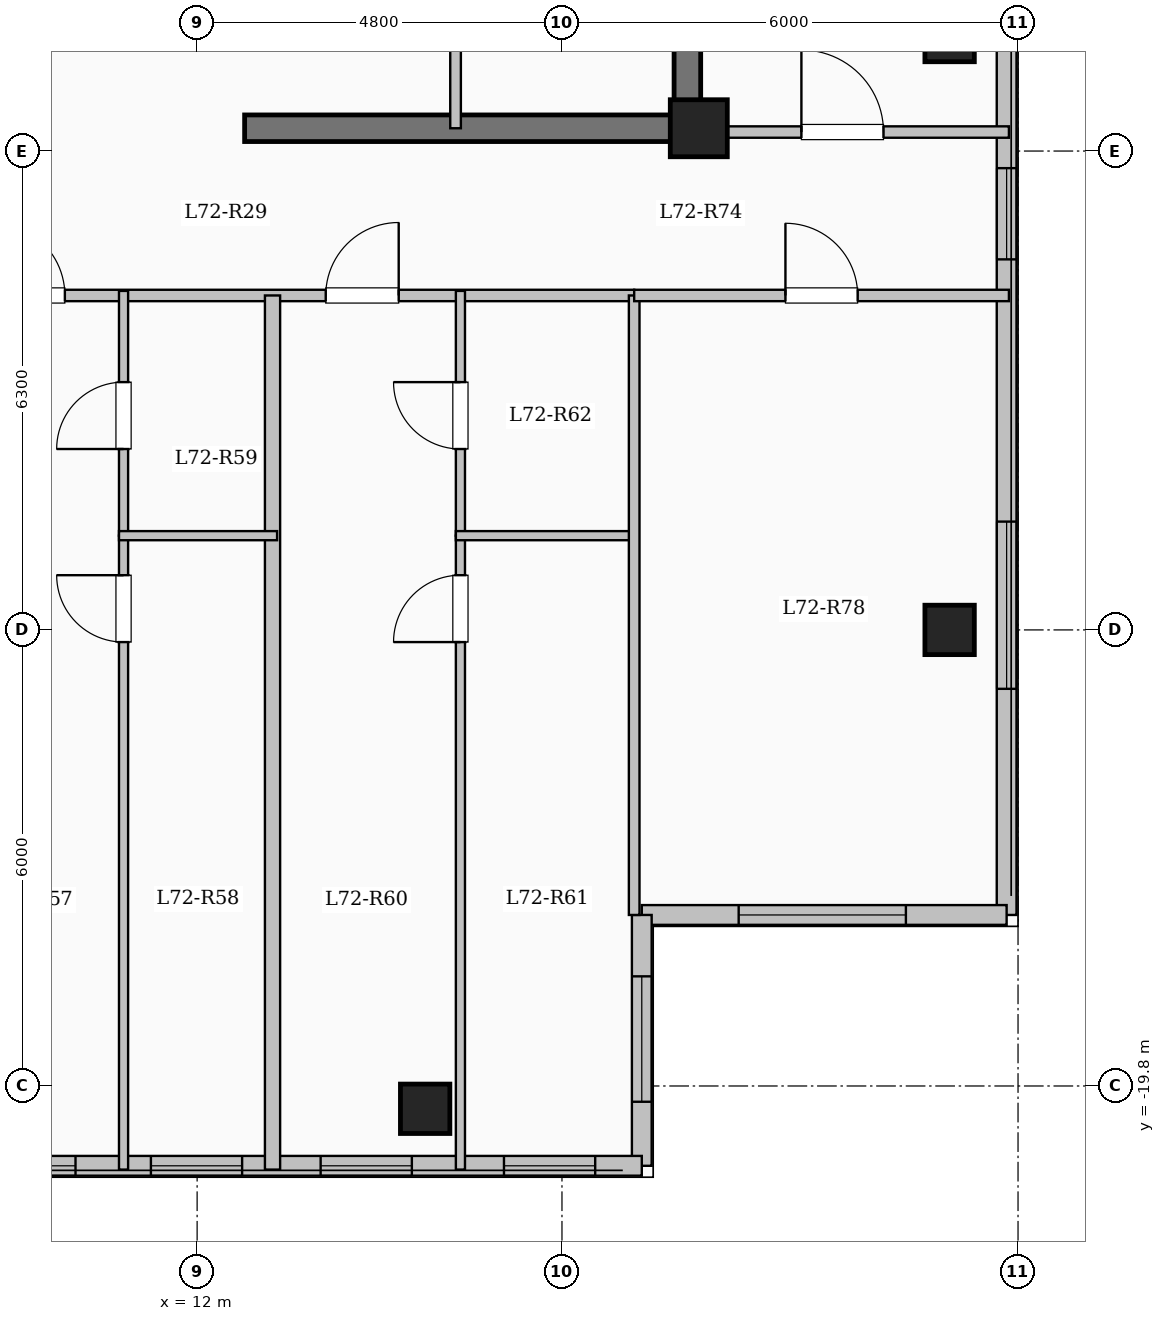
"""IFC4 building model, lengths in metres.
Left out: names, types, materials, properties, quantities, classifications, styles, units other than length and angle.
Written with IfcOpenShell. Run it as: python <this file> out.ifc"""

import sys

from ifc_helpers import new_model, si_unit, direction, frame, frame_2d, origin, origin_2d, place, context, subcontext, project, spatial, rectangle, extrude, element, fill, save


model = new_model("IFC4")
c1 = context("Model", 3, precision=1e-05, world=origin(), true_north=direction((0.0, 1.0)))
c2 = subcontext(c1, "Body", "Model", "MODEL_VIEW")
j1 = project(units=[si_unit("LENGTHUNIT", "METRE"), si_unit("PLANEANGLEUNIT", "RADIAN")], contexts=[c1])
p1 = place(None, origin())
s1 = spatial("IfcSite", under=j1, at=p1, CompositionType="ELEMENT")
p2 = place(p1, origin())
s2 = spatial("IfcBuilding", under=s1, at=p2, CompositionType="ELEMENT")
p3 = place(p2, frame((0.0, 0.0, 264.95)))
s3 = spatial("IfcBuildingStorey", under=s2, at=p3, CompositionType="ELEMENT", Elevation=264.95)
p4 = place(p3, frame((18.6, -7.2, 0.0), z_axis=(0.0, 0.0, 1.0), x_axis=(1.0, 0.0, 0.0)))
e1 = element("IfcColumn", 1, at=p4, inside=s3, PredefinedType="COLUMN", context=c2, shape_type="SweptSolid", body=[
    extrude(rectangle(XDim=0.75, YDim=0.75, at=origin_2d()), origin(), (0.0, 0.0, 1.0), 3.35),
])
for number, where, z_axis, x_axis in (
    (2, (15.0, -20.1, 0.0), (0.0, 0.0, 1.0), (1.0, 0.0, 0.0)),
    (3, (21.9, -13.8, 0.0), (0.0, 0.0, 1.0), (1.0, 0.0, 0.0)),
    (4, (21.9, -6.0, 0.0), (0.0, 0.0, 1.0), (1.0, 0.0, 0.0)),
):
    element("IfcColumn", number, at=place(p3, frame(where, z_axis=z_axis, x_axis=x_axis)), inside=s3, PredefinedType="COLUMN", context=c2, shape_type="SweptSolid", body=[
        extrude(rectangle(XDim=0.65, YDim=0.65, at=origin_2d()), origin(), (0.0, 0.0, 1.0), 3.35),
    ])
p5 = place(p3, frame((22.65, 17.55, 0.0), z_axis=(0.0, 0.0, 1.0), x_axis=(0.0, -1.0, 0.0)))
e5 = element("IfcWall", 5, at=p5, inside=s3, PredefinedType="SOLIDWALL", context=c2, shape_type="SweptSolid", body=[
    extrude(rectangle(XDim=35.1, YDim=0.26, at=frame_2d((17.55, 0.0))), origin(), (0.0, 0.0, 1.0), 3.1),
])
p6 = place(p5, frame((1.525, 0.0, 0.9)))
e6 = element("IfcOpeningElement", 6, at=p6, cuts=e5, PredefinedType="OPENING", context=c2, shape_type="SweptSolid", body=[
    extrude(rectangle(XDim=2.0, YDim=1.7, at=frame_2d((1.0, 0.85))), frame((0.0, 0.14, 0.0), z_axis=(0.0, -1.0, 0.0), x_axis=(1.0, 0.0, 0.0)), (0.0, 0.0, 1.0), 0.28),
])
p7 = place(p5, frame((5.425, 0.0, 0.95)))
e7 = element("IfcOpeningElement", 7, at=p7, cuts=e5, PredefinedType="OPENING", context=c2, shape_type="SweptSolid", body=[
    extrude(rectangle(XDim=1.0, YDim=1.5, at=frame_2d((0.5, 0.75))), frame((0.0, 0.14, 0.0), z_axis=(0.0, -1.0, 0.0), x_axis=(1.0, 0.0, 0.0)), (0.0, 0.0, 1.0), 0.28),
])
p8 = place(p5, frame((14.8, 0.0, 0.9)))
e8 = element("IfcOpeningElement", 8, at=p8, cuts=e5, PredefinedType="OPENING", context=c2, shape_type="SweptSolid", body=[
    extrude(rectangle(XDim=2.0, YDim=1.7, at=frame_2d((1.0, 0.85))), frame((0.0, 0.14, 0.0), z_axis=(0.0, -1.0, 0.0), x_axis=(1.0, 0.0, 0.0)), (0.0, 0.0, 1.0), 0.28),
])
p9 = place(p5, frame((25.275, 0.0, 0.95)))
e9 = element("IfcOpeningElement", 9, at=p9, cuts=e5, PredefinedType="OPENING", context=c2, shape_type="SweptSolid", body=[
    extrude(rectangle(XDim=1.2, YDim=1.5, at=frame_2d((0.6, 0.75))), frame((0.0, 0.14, 0.0), z_axis=(0.0, -1.0, 0.0), x_axis=(1.0, 0.0, 0.0)), (0.0, 0.0, 1.0), 0.28),
])
p10 = place(p5, frame((29.925, 0.0, 0.9)))
e10 = element("IfcOpeningElement", 10, at=p10, cuts=e5, PredefinedType="OPENING", context=c2, shape_type="SweptSolid", body=[
    extrude(rectangle(XDim=2.2, YDim=1.75, at=frame_2d((1.1, 0.875))), frame((0.0, 0.14, 0.0), z_axis=(0.0, -1.0, 0.0), x_axis=(1.0, 0.0, 0.0)), (0.0, 0.0, 1.0), 0.28),
])
p11 = place(p3, frame((22.65, -17.55, 0.0), z_axis=(0.0, 0.0, 1.0), x_axis=(-1.0, 0.0, 0.0)))
e11 = element("IfcWall", 11, at=p11, inside=s3, PredefinedType="SOLIDWALL", context=c2, shape_type="SweptSolid", body=[
    extrude(rectangle(XDim=4.8, YDim=0.26, at=frame_2d((2.4, 0.0))), origin(), (0.0, 0.0, 1.0), 3.1),
])
p12 = place(p11, frame((1.325, 0.0, 0.9)))
e12 = element("IfcOpeningElement", 12, at=p12, cuts=e11, PredefinedType="OPENING", context=c2, shape_type="SweptSolid", body=[
    extrude(rectangle(XDim=2.2, YDim=1.75, at=frame_2d((1.1, 0.875))), frame((0.0, 0.14, 0.0), z_axis=(0.0, -1.0, 0.0), x_axis=(1.0, 0.0, 0.0)), (0.0, 0.0, 1.0), 0.28),
])
p13 = place(p3, frame((17.85, -17.55, 0.0), z_axis=(0.0, 0.0, 1.0), x_axis=(0.0, -1.0, 0.0)))
e13 = element("IfcWall", 13, at=p13, inside=s3, PredefinedType="SOLIDWALL", context=c2, shape_type="SweptSolid", body=[
    extrude(rectangle(XDim=3.3, YDim=0.26, at=frame_2d((1.65, 0.0))), origin(), (0.0, 0.0, 1.0), 3.1),
])
p14 = place(p13, frame((0.808, 0.0, 0.9)))
e14 = element("IfcOpeningElement", 14, at=p14, cuts=e13, PredefinedType="OPENING", context=c2, shape_type="SweptSolid", body=[
    extrude(rectangle(XDim=1.65, YDim=1.6, at=frame_2d((0.825, 0.8))), frame((0.0, 0.14, 0.0), z_axis=(0.0, -1.0, 0.0), x_axis=(1.0, 0.0, 0.0)), (0.0, 0.0, 1.0), 0.28),
])
p15 = place(p3, frame((17.85, -20.85, 0.0), z_axis=(0.0, 0.0, 1.0), x_axis=(-1.0, 0.0, 0.0)))
e15 = element("IfcWall", 15, at=p15, inside=s3, PredefinedType="SOLIDWALL", context=c2, shape_type="SweptSolid", body=[
    extrude(rectangle(XDim=10.5, YDim=0.26, at=frame_2d((5.25, 0.0))), origin(), (0.0, 0.0, 1.0), 3.1),
])
p16 = place(p15, frame((0.613, 0.0, 0.95)))
e16 = element("IfcOpeningElement", 16, at=p16, cuts=e15, PredefinedType="OPENING", context=c2, shape_type="SweptSolid", body=[
    extrude(rectangle(XDim=1.2, YDim=1.5, at=frame_2d((0.6, 0.75))), frame((0.0, 0.14, 0.0), z_axis=(0.0, -1.0, 0.0), x_axis=(1.0, 0.0, 0.0)), (0.0, 0.0, 1.0), 0.28),
])
p17 = place(p15, frame((3.025, 0.0, 0.95)))
e17 = element("IfcOpeningElement", 17, at=p17, cuts=e15, PredefinedType="OPENING", context=c2, shape_type="SweptSolid", body=[
    extrude(rectangle(XDim=1.2, YDim=1.5, at=frame_2d((0.6, 0.75))), frame((0.0, 0.14, 0.0), z_axis=(0.0, -1.0, 0.0), x_axis=(1.0, 0.0, 0.0)), (0.0, 0.0, 1.0), 0.28),
])
p18 = place(p15, frame((5.258, 0.0, 0.95)))
e18 = element("IfcOpeningElement", 18, at=p18, cuts=e15, PredefinedType="OPENING", context=c2, shape_type="SweptSolid", body=[
    extrude(rectangle(XDim=1.2, YDim=1.5, at=frame_2d((0.6, 0.75))), frame((0.0, 0.14, 0.0), z_axis=(0.0, -1.0, 0.0), x_axis=(1.0, 0.0, 0.0)), (0.0, 0.0, 1.0), 0.28),
])
p19 = place(p15, frame((7.45, 0.0, 0.95)))
e19 = element("IfcOpeningElement", 19, at=p19, cuts=e15, PredefinedType="OPENING", context=c2, shape_type="SweptSolid", body=[
    extrude(rectangle(XDim=1.2, YDim=1.5, at=frame_2d((0.6, 0.75))), frame((0.0, 0.14, 0.0), z_axis=(0.0, -1.0, 0.0), x_axis=(1.0, 0.0, 0.0)), (0.0, 0.0, 1.0), 0.28),
])
p20 = place(p15, frame((9.505, 0.0, 0.95)))
e20 = element("IfcOpeningElement", 20, at=p20, cuts=e15, PredefinedType="OPENING", context=c2, shape_type="SweptSolid", body=[
    extrude(rectangle(XDim=0.85, YDim=1.5, at=frame_2d((0.425, 0.75))), frame((0.0, 0.14, 0.0), z_axis=(0.0, -1.0, 0.0), x_axis=(1.0, 0.0, 0.0)), (0.0, 0.0, 1.0), 0.28),
])
p21 = place(p3, frame((18.45, -7.375, 0.0), z_axis=(0.0, 0.0, 1.0), x_axis=(0.0, 1.0, 0.0)))
e21 = element("IfcWall", 21, at=p21, inside=s3, PredefinedType="SHEAR", context=c2, shape_type="SweptSolid", body=[
    extrude(rectangle(XDim=14.05, YDim=0.35, at=frame_2d((7.025, 0.0))), origin(), (0.0, 0.0, 1.0), 3.35),
])
p22 = place(p3, frame((12.625, -7.2, 0.0), z_axis=(0.0, 0.0, 1.0), x_axis=(1.0, 0.0, 0.0)))
e22 = element("IfcWall", 22, at=p22, inside=s3, PredefinedType="SHEAR", context=c2, shape_type="SweptSolid", body=[
    extrude(rectangle(XDim=6.0, YDim=0.35, at=frame_2d((3.0, 0.0))), origin(), (0.0, 0.0, 1.0), 3.35),
])
p23 = place(p3, frame((15.4, -7.2, 0.0), z_axis=(0.0, 0.0, 1.0), x_axis=(0.0, 1.0, 0.0)))
e23 = element("IfcWall", 23, at=p23, inside=s3, PredefinedType="PARTITIONING", context=c2, shape_type="SweptSolid", body=[
    extrude(rectangle(XDim=10.45, YDim=0.14, at=frame_2d((5.225, 0.0))), origin(), (0.0, 0.0, 1.0), 3.1),
])
p24 = place(p23, frame((9.25, 0.0, 0.0)))
e24 = element("IfcOpeningElement", 24, at=p24, cuts=e23, PredefinedType="OPENING", context=c2, shape_type="SweptSolid", body=[
    extrude(rectangle(XDim=0.9, YDim=2.08, at=frame_2d((0.45, 1.04))), frame((0.0, 0.08, 0.0), z_axis=(0.0, -1.0, 0.0), x_axis=(1.0, 0.0, 0.0)), (0.0, 0.0, 1.0), 0.16),
])
p25 = place(p3, frame((8.55, -9.4, 0.0), z_axis=(0.0, 0.0, 1.0), x_axis=(1.0, 0.0, 0.0)))
e25 = element("IfcWall", 25, at=p25, inside=s3, PredefinedType="PARTITIONING", context=c2, shape_type="SweptSolid", body=[
    extrude(rectangle(XDim=9.2, YDim=0.15, at=frame_2d((4.6, 0.0))), origin(), (0.0, 0.0, 1.0), 3.1),
])
p26 = place(p25, frame((0.75, 0.0, 0.0)))
e26 = element("IfcOpeningElement", 26, at=p26, cuts=e25, PredefinedType="OPENING", context=c2, shape_type="SweptSolid", body=[
    extrude(rectangle(XDim=0.96, YDim=2.15, at=frame_2d((0.48, 1.075))), frame((0.0, 0.085, 0.0), z_axis=(0.0, -1.0, 0.0), x_axis=(1.0, 0.0, 0.0)), (0.0, 0.0, 1.0), 0.17),
])
p27 = place(p25, frame((5.142, 0.0, 0.0)))
e27 = element("IfcOpeningElement", 27, at=p27, cuts=e25, PredefinedType="OPENING", context=c2, shape_type="SweptSolid", body=[
    extrude(rectangle(XDim=0.96, YDim=2.15, at=frame_2d((0.48, 1.075))), frame((0.0, 0.085, 0.0), z_axis=(0.0, -1.0, 0.0), x_axis=(1.0, 0.0, 0.0)), (0.0, 0.0, 1.0), 0.17),
])
p28 = place(p3, frame((12.992, -20.9, 0.0), z_axis=(0.0, 0.0, 1.0), x_axis=(0.0, 1.0, 0.0)))
e28 = element("IfcWall", 28, at=p28, inside=s3, PredefinedType="SOLIDWALL", context=c2, shape_type="SweptSolid", body=[
    extrude(rectangle(XDim=11.5, YDim=0.2, at=frame_2d((5.75, 0.0))), origin(), (0.0, 0.0, 1.0), 3.1),
])
p29 = place(p3, frame((11.032, -20.9, 0.0), z_axis=(0.0, 0.0, 1.0), x_axis=(0.0, 1.0, 0.0)))
e29 = element("IfcWall", 29, at=p29, inside=s3, PredefinedType="PARTITIONING", context=c2, shape_type="SweptSolid", body=[
    extrude(rectangle(XDim=8.34, YDim=0.12, at=frame_2d((4.17, 0.0))), origin(), (0.0, 0.0, 1.0), 3.1),
])
p30 = place(p29, frame((6.94, 0.0, 0.0)))
e30 = element("IfcOpeningElement", 30, at=p30, cuts=e29, PredefinedType="OPENING", context=c2, shape_type="SweptSolid", body=[
    extrude(rectangle(XDim=0.88, YDim=2.1, at=frame_2d((0.44, 1.05))), frame((0.0, 0.07, 0.0), z_axis=(0.0, -1.0, 0.0), x_axis=(1.0, 0.0, 0.0)), (0.0, 0.0, 1.0), 0.14),
])
p31 = place(p3, frame((11.032, -12.56, 0.0), z_axis=(0.0, 0.0, 1.0), x_axis=(0.0, 1.0, 0.0)))
e31 = element("IfcWall", 31, at=p31, inside=s3, PredefinedType="PARTITIONING", context=c2, shape_type="SweptSolid", body=[
    extrude(rectangle(XDim=3.22, YDim=0.12, at=frame_2d((1.61, 0.0))), origin(), (0.0, 0.0, 1.0), 3.1),
])
p32 = place(p31, frame((1.14, 0.0, 0.0)))
e32 = element("IfcOpeningElement", 32, at=p32, cuts=e31, PredefinedType="OPENING", context=c2, shape_type="SweptSolid", body=[
    extrude(rectangle(XDim=0.88, YDim=2.1, at=frame_2d((0.44, 1.05))), frame((0.0, 0.07, 0.0), z_axis=(0.0, -1.0, 0.0), x_axis=(1.0, 0.0, 0.0)), (0.0, 0.0, 1.0), 0.14),
])
p33 = place(p3, frame((10.972, -12.56, 0.0), z_axis=(0.0, 0.0, 1.0), x_axis=(1.0, 0.0, 0.0)))
e33 = element("IfcWall", 33, at=p33, inside=s3, PredefinedType="PARTITIONING", context=c2, shape_type="SweptSolid", body=[
    extrude(rectangle(XDim=2.08, YDim=0.12, at=frame_2d((1.04, 0.0))), origin(), (0.0, 0.0, 1.0), 2.785),
])
p34 = place(p3, frame((15.464, -20.9, 0.0), z_axis=(0.0, 0.0, 1.0), x_axis=(0.0, 1.0, 0.0)))
e34 = element("IfcWall", 34, at=p34, inside=s3, PredefinedType="PARTITIONING", context=c2, shape_type="SweptSolid", body=[
    extrude(rectangle(XDim=8.34, YDim=0.12, at=frame_2d((4.17, 0.0))), origin(), (0.0, 0.0, 1.0), 3.1),
])
p35 = place(p34, frame((6.94, 0.0, 0.0)))
e35 = element("IfcOpeningElement", 35, at=p35, cuts=e34, PredefinedType="OPENING", context=c2, shape_type="SweptSolid", body=[
    extrude(rectangle(XDim=0.88, YDim=2.1, at=frame_2d((0.44, 1.05))), frame((0.0, 0.07, 0.0), z_axis=(0.0, -1.0, 0.0), x_axis=(1.0, 0.0, 0.0)), (0.0, 0.0, 1.0), 0.14),
])
p36 = place(p3, frame((15.464, -12.56, 0.0), z_axis=(0.0, 0.0, 1.0), x_axis=(0.0, 1.0, 0.0)))
e36 = element("IfcWall", 36, at=p36, inside=s3, PredefinedType="PARTITIONING", context=c2, shape_type="SweptSolid", body=[
    extrude(rectangle(XDim=3.22, YDim=0.12, at=frame_2d((1.61, 0.0))), origin(), (0.0, 0.0, 1.0), 3.1),
])
p37 = place(p36, frame((1.14, 0.0, 0.0)))
e37 = element("IfcOpeningElement", 37, at=p37, cuts=e36, PredefinedType="OPENING", context=c2, shape_type="SweptSolid", body=[
    extrude(rectangle(XDim=0.88, YDim=2.1, at=frame_2d((0.44, 1.05))), frame((0.0, 0.07, 0.0), z_axis=(0.0, -1.0, 0.0), x_axis=(1.0, 0.0, 0.0)), (0.0, 0.0, 1.0), 0.14),
])
p38 = place(p3, frame((15.404, -12.56, 0.0), z_axis=(0.0, 0.0, 1.0), x_axis=(1.0, 0.0, 0.0)))
e38 = element("IfcWall", 38, at=p38, inside=s3, PredefinedType="PARTITIONING", context=c2, shape_type="SweptSolid", body=[
    extrude(rectangle(XDim=2.406, YDim=0.12, at=frame_2d((1.203, 0.0))), origin(), (0.0, 0.0, 1.0), 3.1),
])
p39 = place(p3, frame((18.45, -7.25, 0.0), z_axis=(0.0, 0.0, 1.0), x_axis=(1.0, 0.0, 0.0)))
e39 = element("IfcWall", 39, at=p39, inside=s3, PredefinedType="PARTITIONING", context=c2, shape_type="SweptSolid", body=[
    extrude(rectangle(XDim=4.23, YDim=0.15, at=frame_2d((2.115, 0.0))), origin(), (0.0, 0.0, 1.0), 3.1),
])
p40 = place(p39, frame((1.5, 0.0, 0.0)))
e40 = element("IfcOpeningElement", 40, at=p40, cuts=e39, PredefinedType="OPENING", context=c2, shape_type="SweptSolid", body=[
    extrude(rectangle(XDim=1.08, YDim=2.15, at=frame_2d((0.54, 1.075))), frame((0.0, 0.085, 0.0), z_axis=(0.0, -1.0, 0.0), x_axis=(1.0, 0.0, 0.0)), (0.0, 0.0, 1.0), 0.17),
])
p41 = place(p3, frame((17.75, -17.55, 0.0), z_axis=(0.0, 0.0, 1.0), x_axis=(0.0, 1.0, 0.0)))
e41 = element("IfcWall", 41, at=p41, inside=s3, PredefinedType="PARTITIONING", context=c2, shape_type="SweptSolid", body=[
    extrude(rectangle(XDim=8.15, YDim=0.14, at=frame_2d((4.075, 0.0))), origin(), (0.0, 0.0, 1.0), 3.1),
])
p42 = place(p3, frame((17.75, -9.4, 0.0), z_axis=(0.0, 0.0, 1.0), x_axis=(1.0, 0.0, 0.0)))
e42 = element("IfcWall", 42, at=p42, inside=s3, PredefinedType="PARTITIONING", context=c2, shape_type="SweptSolid", body=[
    extrude(rectangle(XDim=4.93, YDim=0.15, at=frame_2d((2.465, 0.0))), origin(), (0.0, 0.0, 1.0), 3.1),
])
p43 = place(p42, frame((1.99, 0.0, 0.0)))
e43 = element("IfcOpeningElement", 43, at=p43, cuts=e42, PredefinedType="OPENING", context=c2, shape_type="SweptSolid", body=[
    extrude(rectangle(XDim=0.95, YDim=2.15, at=frame_2d((0.475, 1.075))), frame((0.0, 0.085, 0.0), z_axis=(0.0, -1.0, 0.0), x_axis=(1.0, 0.0, 0.0)), (0.0, 0.0, 1.0), 0.17),
])
p44 = place(p9, origin())
e44 = element("IfcWindow", 44, at=p44, inside=s3, PartitioningType="SINGLE_PANEL", PredefinedType="WINDOW", context=c2, shape_type="SweptSolid", body=[
    extrude(rectangle(XDim=1.2, YDim=1.5, at=frame_2d((0.6, 0.75))), frame((0.0, 0.03, 0.0), z_axis=(0.0, -1.0, 0.0), x_axis=(1.0, 0.0, 0.0)), (0.0, 0.0, 1.0), 0.06),
])
fill(e9, e44)
p45 = place(p10, origin())
e45 = element("IfcWindow", 45, at=p45, inside=s3, PartitioningType="SINGLE_PANEL", PredefinedType="WINDOW", context=c2, shape_type="SweptSolid", body=[
    extrude(rectangle(XDim=2.2, YDim=1.75, at=frame_2d((1.1, 0.875))), frame((0.0, 0.03, 0.0), z_axis=(0.0, -1.0, 0.0), x_axis=(1.0, 0.0, 0.0)), (0.0, 0.0, 1.0), 0.06),
])
fill(e10, e45)
p46 = place(p12, origin())
e46 = element("IfcWindow", 46, at=p46, inside=s3, PartitioningType="SINGLE_PANEL", PredefinedType="WINDOW", context=c2, shape_type="SweptSolid", body=[
    extrude(rectangle(XDim=2.2, YDim=1.75, at=frame_2d((1.1, 0.875))), frame((0.0, 0.03, 0.0), z_axis=(0.0, -1.0, 0.0), x_axis=(1.0, 0.0, 0.0)), (0.0, 0.0, 1.0), 0.06),
])
fill(e12, e46)
p47 = place(p14, origin())
e47 = element("IfcWindow", 47, at=p47, inside=s3, PartitioningType="SINGLE_PANEL", PredefinedType="WINDOW", context=c2, shape_type="SweptSolid", body=[
    extrude(rectangle(XDim=1.65, YDim=1.6, at=frame_2d((0.825, 0.8))), frame((0.0, 0.03, 0.0), z_axis=(0.0, -1.0, 0.0), x_axis=(1.0, 0.0, 0.0)), (0.0, 0.0, 1.0), 0.06),
])
fill(e14, e47)
p48 = place(p16, origin())
e48 = element("IfcWindow", 48, at=p48, inside=s3, PartitioningType="SINGLE_PANEL", PredefinedType="WINDOW", context=c2, shape_type="SweptSolid", body=[
    extrude(rectangle(XDim=1.2, YDim=1.5, at=frame_2d((0.6, 0.75))), frame((0.0, 0.03, 0.0), z_axis=(0.0, -1.0, 0.0), x_axis=(1.0, 0.0, 0.0)), (0.0, 0.0, 1.0), 0.06),
])
fill(e16, e48)
p49 = place(p17, origin())
e49 = element("IfcWindow", 49, at=p49, inside=s3, PartitioningType="SINGLE_PANEL", PredefinedType="WINDOW", context=c2, shape_type="SweptSolid", body=[
    extrude(rectangle(XDim=1.2, YDim=1.5, at=frame_2d((0.6, 0.75))), frame((0.0, 0.03, 0.0), z_axis=(0.0, -1.0, 0.0), x_axis=(1.0, 0.0, 0.0)), (0.0, 0.0, 1.0), 0.06),
])
fill(e17, e49)
p50 = place(p18, origin())
e50 = element("IfcWindow", 50, at=p50, inside=s3, PartitioningType="SINGLE_PANEL", PredefinedType="WINDOW", context=c2, shape_type="SweptSolid", body=[
    extrude(rectangle(XDim=1.2, YDim=1.5, at=frame_2d((0.6, 0.75))), frame((0.0, 0.03, 0.0), z_axis=(0.0, -1.0, 0.0), x_axis=(1.0, 0.0, 0.0)), (0.0, 0.0, 1.0), 0.06),
])
fill(e18, e50)
p51 = place(p19, origin())
e51 = element("IfcWindow", 51, at=p51, inside=s3, PartitioningType="SINGLE_PANEL", PredefinedType="WINDOW", context=c2, shape_type="SweptSolid", body=[
    extrude(rectangle(XDim=1.2, YDim=1.5, at=frame_2d((0.6, 0.75))), frame((0.0, 0.03, 0.0), z_axis=(0.0, -1.0, 0.0), x_axis=(1.0, 0.0, 0.0)), (0.0, 0.0, 1.0), 0.06),
])
fill(e19, e51)
p52 = place(p26, origin())
e52 = element("IfcDoor", 52, at=p52, inside=s3, OperationType="SINGLE_SWING_LEFT", PredefinedType="DOOR", context=c2, shape_type="SweptSolid", body=[
    extrude(rectangle(XDim=0.96, YDim=2.15, at=frame_2d((0.48, 1.075))), frame((0.0, 0.025, 0.0), z_axis=(0.0, -1.0, 0.0), x_axis=(1.0, 0.0, 0.0)), (0.0, 0.0, 1.0), 0.05),
])
fill(e26, e52)
p53 = place(p30, origin())
e53 = element("IfcDoor", 53, at=p53, inside=s3, OperationType="SINGLE_SWING_RIGHT", PredefinedType="DOOR", context=c2, shape_type="SweptSolid", body=[
    extrude(rectangle(XDim=0.88, YDim=2.1, at=frame_2d((0.44, 1.05))), frame((0.0, 0.025, 0.0), z_axis=(0.0, -1.0, 0.0), x_axis=(1.0, 0.0, 0.0)), (0.0, 0.0, 1.0), 0.05),
])
fill(e30, e53)
p54 = place(p32, origin())
e54 = element("IfcDoor", 54, at=p54, inside=s3, OperationType="SINGLE_SWING_LEFT", PredefinedType="DOOR", context=c2, shape_type="SweptSolid", body=[
    extrude(rectangle(XDim=0.88, YDim=2.1, at=frame_2d((0.44, 1.05))), frame((0.0, 0.025, 0.0), z_axis=(0.0, -1.0, 0.0), x_axis=(1.0, 0.0, 0.0)), (0.0, 0.0, 1.0), 0.05),
])
fill(e32, e54)
p55 = place(p27, origin())
e55 = element("IfcDoor", 55, at=p55, inside=s3, OperationType="SINGLE_SWING_RIGHT", PredefinedType="DOOR", context=c2, shape_type="SweptSolid", body=[
    extrude(rectangle(XDim=0.96, YDim=2.15, at=frame_2d((0.48, 1.075))), frame((0.0, 0.025, 0.0), z_axis=(0.0, -1.0, 0.0), x_axis=(1.0, 0.0, 0.0)), (0.0, 0.0, 1.0), 0.05),
])
fill(e27, e55)
p56 = place(p35, origin())
e56 = element("IfcDoor", 56, at=p56, inside=s3, OperationType="SINGLE_SWING_LEFT", PredefinedType="DOOR", context=c2, shape_type="SweptSolid", body=[
    extrude(rectangle(XDim=0.88, YDim=2.1, at=frame_2d((0.44, 1.05))), frame((0.0, 0.025, 0.0), z_axis=(0.0, -1.0, 0.0), x_axis=(1.0, 0.0, 0.0)), (0.0, 0.0, 1.0), 0.05),
])
fill(e35, e56)
p57 = place(p37, origin())
e57 = element("IfcDoor", 57, at=p57, inside=s3, OperationType="SINGLE_SWING_RIGHT", PredefinedType="DOOR", context=c2, shape_type="SweptSolid", body=[
    extrude(rectangle(XDim=0.88, YDim=2.1, at=frame_2d((0.44, 1.05))), frame((0.0, 0.025, 0.0), z_axis=(0.0, -1.0, 0.0), x_axis=(1.0, 0.0, 0.0)), (0.0, 0.0, 1.0), 0.05),
])
fill(e37, e57)
p58 = place(p43, origin())
e58 = element("IfcDoor", 58, at=p58, inside=s3, OperationType="SINGLE_SWING_LEFT", PredefinedType="DOOR", context=c2, shape_type="SweptSolid", body=[
    extrude(rectangle(XDim=0.95, YDim=2.15, at=frame_2d((0.475, 1.075))), frame((0.0, 0.025, 0.0), z_axis=(0.0, -1.0, 0.0), x_axis=(1.0, 0.0, 0.0)), (0.0, 0.0, 1.0), 0.05),
])
fill(e43, e58)
p59 = place(p40, origin())
e59 = element("IfcDoor", 59, at=p59, inside=s3, OperationType="SINGLE_SWING_LEFT", PredefinedType="DOOR", context=c2, shape_type="SweptSolid", body=[
    extrude(rectangle(XDim=1.08, YDim=2.15, at=frame_2d((0.54, 1.075))), frame((0.0, 0.025, 0.0), z_axis=(0.0, -1.0, 0.0), x_axis=(1.0, 0.0, 0.0)), (0.0, 0.0, 1.0), 0.05),
])
fill(e40, e59)
save(model, sys.argv[1])
